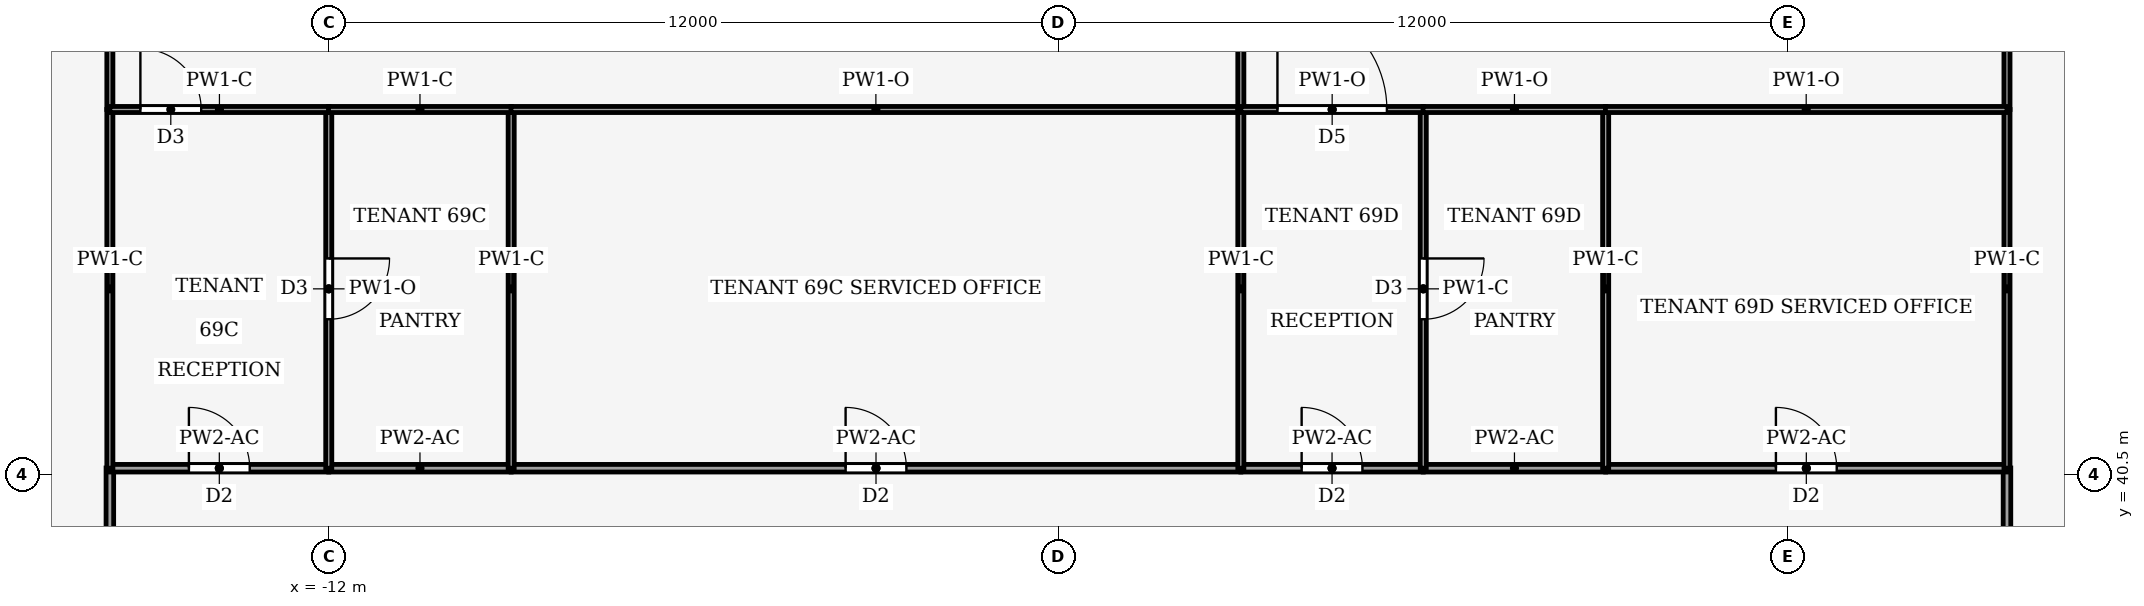
"""IFC4 building model, lengths in metres.
Left out: names, types, materials, properties, quantities, classifications, styles, units other than length and angle.
Written with IfcOpenShell. Run it as: python <this file> out.ifc"""

import sys

from ifc_helpers import new_model, si_unit, direction, frame, frame_2d, origin, place, context, subcontext, project, spatial, rectangle, extrude, element, fill, save


model = new_model("IFC4")
c1 = context("Model", 3, precision=1e-05, world=origin(), true_north=direction((0.0, 1.0)))
c2 = subcontext(c1, "Body", "Model", "MODEL_VIEW")
j1 = project(units=[si_unit("LENGTHUNIT", "METRE"), si_unit("PLANEANGLEUNIT", "RADIAN")], contexts=[c1])
p1 = place(None, origin())
s1 = spatial("IfcSite", under=j1, at=p1, CompositionType="ELEMENT")
p2 = place(p1, origin())
s2 = spatial("IfcBuilding", under=s1, at=p2, CompositionType="ELEMENT")
p3 = place(p2, frame((0.0, 0.0, 302.0)))
s3 = spatial("IfcBuildingStorey", under=s2, at=p3, CompositionType="ELEMENT", Elevation=302.0)
p4 = place(p3, frame((-15.6, 34.5, 0.0), z_axis=(0.0, 0.0, 1.0), x_axis=(0.0, 1.0, 0.0)))
e1 = element("IfcWall", 1, at=p4, inside=s3, PredefinedType="PARTITIONING", context=c2, shape_type="SweptSolid", body=[
    extrude(rectangle(XDim=6.104, YDim=0.125, at=frame_2d((3.052, 0.0))), origin(), (0.0, 0.0, 1.0), 3.14),
])
p5 = place(p4, frame((2.552, 0.0, 0.0)))
e2 = element("IfcOpeningElement", 2, at=p5, cuts=e1, PredefinedType="OPENING", context=c2, shape_type="SweptSolid", body=[
    extrude(rectangle(XDim=1.0, YDim=2.1, at=frame_2d((0.5, 1.05))), frame((0.0, 0.073, 0.0), z_axis=(0.0, -1.0, 0.0), x_axis=(1.0, 0.0, 0.0)), (0.0, 0.0, 1.0), 0.145),
])
p6 = place(p3, frame((15.6, 40.604, 0.0), z_axis=(0.0, 0.0, 1.0), x_axis=(0.0, -1.0, 0.0)))
e3 = element("IfcWall", 3, at=p6, inside=s3, PredefinedType="PARTITIONING", context=c2, shape_type="SweptSolid", body=[
    extrude(rectangle(XDim=6.104, YDim=0.125, at=frame_2d((3.052, 0.0))), origin(), (0.0, 0.0, 1.0), 3.14),
])
p7 = place(p6, frame((2.552, 0.0, 0.0)))
e4 = element("IfcOpeningElement", 4, at=p7, cuts=e3, PredefinedType="OPENING", context=c2, shape_type="SweptSolid", body=[
    extrude(rectangle(XDim=1.0, YDim=2.1, at=frame_2d((0.5, 1.05))), frame((0.0, 0.073, 0.0), z_axis=(0.0, -1.0, 0.0), x_axis=(1.0, 0.0, 0.0)), (0.0, 0.0, 1.0), 0.145),
])
p8 = place(p3, frame((-15.6, 40.6, 0.0), z_axis=(0.0, 0.0, 1.0), x_axis=(1.0, 0.0, 0.0)))
e5 = element("IfcWall", 5, at=p8, inside=s3, PredefinedType="PARTITIONING", context=c2, shape_type="SweptSolid", body=[
    extrude(rectangle(XDim=3.6, YDim=0.125, at=frame_2d((1.8, 0.0))), origin(), (0.0, 0.0, 1.0), 3.39),
])
p9 = place(p8, frame((1.3, 0.0, 0.0)))
e6 = element("IfcOpeningElement", 6, at=p9, cuts=e5, PredefinedType="OPENING", context=c2, shape_type="SweptSolid", body=[
    extrude(rectangle(XDim=1.0, YDim=2.1, at=frame_2d((0.5, 1.05))), frame((0.0, 0.073, 0.0), z_axis=(0.0, -1.0, 0.0), x_axis=(1.0, 0.0, 0.0)), (0.0, 0.0, 1.0), 0.145),
])
p10 = place(p3, frame((-9.0, 40.6, 0.0), z_axis=(0.0, 0.0, 1.0), x_axis=(-1.0, 0.0, 0.0)))
e7 = element("IfcWall", 7, at=p10, inside=s3, PredefinedType="PARTITIONING", context=c2, shape_type="SweptSolid", body=[
    extrude(rectangle(XDim=3.0, YDim=0.125, at=frame_2d((1.5, 0.0))), origin(), (0.0, 0.0, 1.0), 3.39),
])
p11 = place(p3, frame((-9.0, 40.6, 0.0), z_axis=(0.0, 0.0, 1.0), x_axis=(1.0, 0.0, 0.0)))
e8 = element("IfcWall", 8, at=p11, inside=s3, PredefinedType="PARTITIONING", context=c2, shape_type="SweptSolid", body=[
    extrude(rectangle(XDim=12.0, YDim=0.125, at=frame_2d((6.0, 0.0))), origin(), (0.0, 0.0, 1.0), 3.39),
])
p12 = place(p11, frame((5.5, 0.0, 0.0)))
e9 = element("IfcOpeningElement", 9, at=p12, cuts=e8, PredefinedType="OPENING", context=c2, shape_type="SweptSolid", body=[
    extrude(rectangle(XDim=1.0, YDim=2.1, at=frame_2d((0.5, 1.05))), frame((0.0, 0.073, 0.0), z_axis=(0.0, -1.0, 0.0), x_axis=(1.0, 0.0, 0.0)), (0.0, 0.0, 1.0), 0.145),
])
p13 = place(p3, frame((3.0, 40.6, 0.0), z_axis=(0.0, 0.0, 1.0), x_axis=(1.0, 0.0, 0.0)))
e10 = element("IfcWall", 10, at=p13, inside=s3, PredefinedType="PARTITIONING", context=c2, shape_type="SweptSolid", body=[
    extrude(rectangle(XDim=3.0, YDim=0.125, at=frame_2d((1.5, 0.0))), origin(), (0.0, 0.0, 1.0), 3.39),
])
p14 = place(p13, frame((1.0, 0.0, 0.0)))
e11 = element("IfcOpeningElement", 11, at=p14, cuts=e10, PredefinedType="OPENING", context=c2, shape_type="SweptSolid", body=[
    extrude(rectangle(XDim=1.0, YDim=2.1, at=frame_2d((0.5, 1.05))), frame((0.0, 0.073, 0.0), z_axis=(0.0, -1.0, 0.0), x_axis=(1.0, 0.0, 0.0)), (0.0, 0.0, 1.0), 0.145),
])
p15 = place(p3, frame((9.0, 40.6, 0.0), z_axis=(0.0, 0.0, 1.0), x_axis=(-1.0, 0.0, 0.0)))
e12 = element("IfcWall", 12, at=p15, inside=s3, PredefinedType="PARTITIONING", context=c2, shape_type="SweptSolid", body=[
    extrude(rectangle(XDim=3.0, YDim=0.125, at=frame_2d((1.5, 0.0))), origin(), (0.0, 0.0, 1.0), 3.39),
])
p16 = place(p3, frame((9.0, 40.6, 0.0), z_axis=(0.0, 0.0, 1.0), x_axis=(1.0, 0.0, 0.0)))
e13 = element("IfcWall", 13, at=p16, inside=s3, PredefinedType="PARTITIONING", context=c2, shape_type="SweptSolid", body=[
    extrude(rectangle(XDim=6.6, YDim=0.125, at=frame_2d((3.3, 0.0))), origin(), (0.0, 0.0, 1.0), 3.39),
])
p17 = place(p16, frame((2.8, 0.0, 0.0)))
e14 = element("IfcOpeningElement", 14, at=p17, cuts=e13, PredefinedType="OPENING", context=c2, shape_type="SweptSolid", body=[
    extrude(rectangle(XDim=1.0, YDim=2.1, at=frame_2d((0.5, 1.05))), frame((0.0, 0.073, 0.0), z_axis=(0.0, -1.0, 0.0), x_axis=(1.0, 0.0, 0.0)), (0.0, 0.0, 1.0), 0.145),
])
p18 = place(p3, frame((-15.6, 40.6, 0.0), z_axis=(0.0, 0.0, 1.0), x_axis=(0.0, 1.0, 0.0)))
e15 = element("IfcWall", 15, at=p18, inside=s3, PredefinedType="PARTITIONING", context=c2, shape_type="SweptSolid", body=[
    extrude(rectangle(XDim=5.9, YDim=0.1, at=frame_2d((2.95, 0.0))), origin(), (0.0, 0.0, 1.0), 3.87),
])
p19 = place(p3, frame((-15.6, 46.5, 0.0), z_axis=(0.0, 0.0, 1.0), x_axis=(0.0, 1.0, 0.0)))
e16 = element("IfcWall", 16, at=p19, inside=s3, PredefinedType="PARTITIONING", context=c2, shape_type="SweptSolid", body=[
    extrude(rectangle(XDim=18.0, YDim=0.1, at=frame_2d((9.0, 0.0))), origin(), (0.0, 0.0, 1.0), 3.35),
])
p20 = place(p3, frame((15.6, 46.5, 0.0), z_axis=(0.0, 0.0, 1.0), x_axis=(0.0, -1.0, 0.0)))
e17 = element("IfcWall", 17, at=p20, inside=s3, PredefinedType="PARTITIONING", context=c2, shape_type="SweptSolid", body=[
    extrude(rectangle(XDim=5.9, YDim=0.1, at=frame_2d((2.95, 0.0))), origin(), (0.0, 0.0, 1.0), 3.87),
])
p21 = place(p3, frame((15.6, 64.5, 0.0), z_axis=(0.0, 0.0, 1.0), x_axis=(0.0, -1.0, 0.0)))
e18 = element("IfcWall", 18, at=p21, inside=s3, PredefinedType="PARTITIONING", context=c2, shape_type="SweptSolid", body=[
    extrude(rectangle(XDim=18.0, YDim=0.1, at=frame_2d((9.0, 0.0))), origin(), (0.0, 0.0, 1.0), 3.35),
])
p22 = place(p3, frame((-12.0, 46.5, 0.0), z_axis=(0.0, 0.0, 1.0), x_axis=(0.0, -1.0, 0.0)))
e19 = element("IfcWall", 19, at=p22, inside=s3, PredefinedType="PARTITIONING", context=c2, shape_type="SweptSolid", body=[
    extrude(rectangle(XDim=5.9, YDim=0.1, at=frame_2d((2.95, 0.0))), origin(), (0.0, 0.0, 1.0), 3.39),
])
p23 = place(p22, frame((2.45, 0.0, 0.0)))
e20 = element("IfcOpeningElement", 20, at=p23, cuts=e19, PredefinedType="OPENING", context=c2, shape_type="SweptSolid", body=[
    extrude(rectangle(XDim=1.0, YDim=2.1, at=frame_2d((0.5, 1.05))), frame((0.0, 0.06, 0.0), z_axis=(0.0, -1.0, 0.0), x_axis=(1.0, 0.0, 0.0)), (0.0, 0.0, 1.0), 0.12),
])
p24 = place(p3, frame((-15.6, 46.5, 0.0), z_axis=(0.0, 0.0, 1.0), x_axis=(1.0, 0.0, 0.0)))
e21 = element("IfcWall", 21, at=p24, inside=s3, PredefinedType="PARTITIONING", context=c2, shape_type="SweptSolid", body=[
    extrude(rectangle(XDim=3.604, YDim=0.1, at=frame_2d((1.802, 0.0))), origin(), (0.0, 0.0, 1.0), 3.87),
])
p25 = place(p24, frame((0.502, 0.0, 0.0)))
e22 = element("IfcOpeningElement", 22, at=p25, cuts=e21, PredefinedType="OPENING", context=c2, shape_type="SweptSolid", body=[
    extrude(rectangle(XDim=1.0, YDim=2.1, at=frame_2d((0.5, 1.05))), frame((0.0, 0.06, 0.0), z_axis=(0.0, -1.0, 0.0), x_axis=(1.0, 0.0, 0.0)), (0.0, 0.0, 1.0), 0.12),
])
p26 = place(p3, frame((-9.0, 40.6, 0.0), z_axis=(0.0, 0.0, 1.0), x_axis=(0.0, 1.0, 0.0)))
e23 = element("IfcWall", 23, at=p26, inside=s3, PredefinedType="PARTITIONING", context=c2, shape_type="SweptSolid", body=[
    extrude(rectangle(XDim=5.9, YDim=0.1, at=frame_2d((2.95, 0.0))), origin(), (0.0, 0.0, 1.0), 3.87),
])
p27 = place(p3, frame((-8.996, 46.5, 0.0), z_axis=(0.0, 0.0, 1.0), x_axis=(-1.0, 0.0, 0.0)))
e24 = element("IfcWall", 24, at=p27, inside=s3, PredefinedType="PARTITIONING", context=c2, shape_type="SweptSolid", body=[
    extrude(rectangle(XDim=3.008, YDim=0.1, at=frame_2d((1.504, 0.0))), origin(), (0.0, 0.0, 1.0), 3.87),
])
p28 = place(p3, frame((3.0, 46.5, 0.0), z_axis=(0.0, 0.0, 1.0), x_axis=(-1.0, 0.0, 0.0)))
e25 = element("IfcWall", 25, at=p28, inside=s3, PredefinedType="PARTITIONING", context=c2, shape_type="SweptSolid", body=[
    extrude(rectangle(XDim=12.004, YDim=0.1, at=frame_2d((6.002, 0.0))), origin(), (0.0, 0.0, 1.0), 3.39),
])
p29 = place(p3, frame((3.0, 40.6, 0.0), z_axis=(0.0, 0.0, 1.0), x_axis=(0.0, 1.0, 0.0)))
e26 = element("IfcWall", 26, at=p29, inside=s3, PredefinedType="PARTITIONING", context=c2, shape_type="SweptSolid", body=[
    extrude(rectangle(XDim=5.9, YDim=0.1, at=frame_2d((2.95, 0.0))), origin(), (0.0, 0.0, 1.0), 3.87),
])
p30 = place(p3, frame((3.0, 46.5, 0.0), z_axis=(0.0, 0.0, 1.0), x_axis=(0.0, 1.0, 0.0)))
e27 = element("IfcWall", 27, at=p30, inside=s3, PredefinedType="PARTITIONING", context=c2, shape_type="SweptSolid", body=[
    extrude(rectangle(XDim=18.0, YDim=0.1, at=frame_2d((9.0, 0.0))), origin(), (0.0, 0.0, 1.0), 3.24),
])
p31 = place(p3, frame((6.0, 46.5, 0.0), z_axis=(0.0, 0.0, 1.0), x_axis=(0.0, -1.0, 0.0)))
e28 = element("IfcWall", 28, at=p31, inside=s3, PredefinedType="PARTITIONING", context=c2, shape_type="SweptSolid", body=[
    extrude(rectangle(XDim=5.9, YDim=0.1, at=frame_2d((2.95, 0.0))), origin(), (0.0, 0.0, 1.0), 3.87),
])
p32 = place(p31, frame((2.45, 0.0, 0.0)))
e29 = element("IfcOpeningElement", 29, at=p32, cuts=e28, PredefinedType="OPENING", context=c2, shape_type="SweptSolid", body=[
    extrude(rectangle(XDim=1.0, YDim=2.1, at=frame_2d((0.5, 1.05))), frame((0.0, 0.06, 0.0), z_axis=(0.0, -1.0, 0.0), x_axis=(1.0, 0.0, 0.0)), (0.0, 0.0, 1.0), 0.12),
])
p33 = place(p3, frame((3.0, 46.5, 0.0), z_axis=(0.0, 0.0, 1.0), x_axis=(1.0, 0.0, 0.0)))
e30 = element("IfcWall", 30, at=p33, inside=s3, PredefinedType="PARTITIONING", context=c2, shape_type="SweptSolid", body=[
    extrude(rectangle(XDim=3.004, YDim=0.1, at=frame_2d((1.502, 0.0))), origin(), (0.0, 0.0, 1.0), 3.39),
])
p34 = place(p33, frame((0.602, 0.0, 0.0)))
e31 = element("IfcOpeningElement", 31, at=p34, cuts=e30, PredefinedType="OPENING", context=c2, shape_type="SweptSolid", body=[
    extrude(rectangle(XDim=1.8, YDim=2.1, at=frame_2d((0.9, 1.05))), frame((0.0, 0.06, 0.0), z_axis=(0.0, -1.0, 0.0), x_axis=(1.0, 0.0, 0.0)), (0.0, 0.0, 1.0), 0.12),
])
p35 = place(p3, frame((9.0, 40.6, 0.0), z_axis=(0.0, 0.0, 1.0), x_axis=(0.0, 1.0, 0.0)))
e32 = element("IfcWall", 32, at=p35, inside=s3, PredefinedType="PARTITIONING", context=c2, shape_type="SweptSolid", body=[
    extrude(rectangle(XDim=5.9, YDim=0.1, at=frame_2d((2.95, 0.0))), origin(), (0.0, 0.0, 1.0), 3.87),
])
p36 = place(p3, frame((9.004, 46.5, 0.0), z_axis=(0.0, 0.0, 1.0), x_axis=(-1.0, 0.0, 0.0)))
e33 = element("IfcWall", 33, at=p36, inside=s3, PredefinedType="PARTITIONING", context=c2, shape_type="SweptSolid", body=[
    extrude(rectangle(XDim=3.008, YDim=0.1, at=frame_2d((1.504, 0.0))), origin(), (0.0, 0.0, 1.0), 3.39),
])
p37 = place(p3, frame((15.6, 46.5, 0.0), z_axis=(0.0, 0.0, 1.0), x_axis=(-1.0, 0.0, 0.0)))
e34 = element("IfcWall", 34, at=p37, inside=s3, PredefinedType="PARTITIONING", context=c2, shape_type="SweptSolid", body=[
    extrude(rectangle(XDim=6.604, YDim=0.1, at=frame_2d((3.302, 0.0))), origin(), (0.0, 0.0, 1.0), 3.39),
])
p38 = place(p9, origin())
e35 = element("IfcDoor", 35, at=p38, inside=s3, OperationType="SINGLE_SWING_LEFT", PredefinedType="DOOR", context=c2, shape_type="SweptSolid", body=[
    extrude(rectangle(XDim=1.0, YDim=2.1, at=frame_2d((0.5, 1.05))), frame((0.0, 0.025, 0.0), z_axis=(0.0, -1.0, 0.0), x_axis=(1.0, 0.0, 0.0)), (0.0, 0.0, 1.0), 0.05),
])
fill(e6, e35)
p39 = place(p12, origin())
e36 = element("IfcDoor", 36, at=p39, inside=s3, OperationType="SINGLE_SWING_RIGHT", PredefinedType="DOOR", context=c2, shape_type="SweptSolid", body=[
    extrude(rectangle(XDim=1.0, YDim=2.1, at=frame_2d((0.5, 1.05))), frame((0.0, 0.025, 0.0), z_axis=(0.0, -1.0, 0.0), x_axis=(1.0, 0.0, 0.0)), (0.0, 0.0, 1.0), 0.05),
])
fill(e9, e36)
p40 = place(p14, origin())
e37 = element("IfcDoor", 37, at=p40, inside=s3, OperationType="SINGLE_SWING_LEFT", PredefinedType="DOOR", context=c2, shape_type="SweptSolid", body=[
    extrude(rectangle(XDim=1.0, YDim=2.1, at=frame_2d((0.5, 1.05))), frame((0.0, 0.025, 0.0), z_axis=(0.0, -1.0, 0.0), x_axis=(1.0, 0.0, 0.0)), (0.0, 0.0, 1.0), 0.05),
])
fill(e11, e37)
p41 = place(p17, origin())
e38 = element("IfcDoor", 38, at=p41, inside=s3, OperationType="SINGLE_SWING_RIGHT", PredefinedType="DOOR", context=c2, shape_type="SweptSolid", body=[
    extrude(rectangle(XDim=1.0, YDim=2.1, at=frame_2d((0.5, 1.05))), frame((0.0, 0.025, 0.0), z_axis=(0.0, -1.0, 0.0), x_axis=(1.0, 0.0, 0.0)), (0.0, 0.0, 1.0), 0.05),
])
fill(e14, e38)
p42 = place(p23, origin())
e39 = element("IfcDoor", 39, at=p42, inside=s3, OperationType="SINGLE_SWING_LEFT", PredefinedType="DOOR", context=c2, shape_type="SweptSolid", body=[
    extrude(rectangle(XDim=1.0, YDim=2.1, at=frame_2d((0.5, 1.05))), frame((0.0, 0.025, 0.0), z_axis=(0.0, -1.0, 0.0), x_axis=(1.0, 0.0, 0.0)), (0.0, 0.0, 1.0), 0.05),
])
fill(e20, e39)
p43 = place(p25, origin())
e40 = element("IfcDoor", 40, at=p43, inside=s3, OperationType="SINGLE_SWING_LEFT", PredefinedType="DOOR", context=c2, shape_type="SweptSolid", body=[
    extrude(rectangle(XDim=1.0, YDim=2.1, at=frame_2d((0.5, 1.05))), frame((0.0, 0.025, 0.0), z_axis=(0.0, -1.0, 0.0), x_axis=(1.0, 0.0, 0.0)), (0.0, 0.0, 1.0), 0.05),
])
fill(e22, e40)
p44 = place(p32, origin())
e41 = element("IfcDoor", 41, at=p44, inside=s3, OperationType="SINGLE_SWING_LEFT", PredefinedType="DOOR", context=c2, shape_type="SweptSolid", body=[
    extrude(rectangle(XDim=1.0, YDim=2.1, at=frame_2d((0.5, 1.05))), frame((0.0, 0.025, 0.0), z_axis=(0.0, -1.0, 0.0), x_axis=(1.0, 0.0, 0.0)), (0.0, 0.0, 1.0), 0.05),
])
fill(e29, e41)
p45 = place(p34, origin())
e42 = element("IfcDoor", 42, at=p45, inside=s3, OperationType="DOUBLE_DOOR_SINGLE_SWING", PredefinedType="DOOR", context=c2, shape_type="SweptSolid", body=[
    extrude(rectangle(XDim=1.8, YDim=2.1, at=frame_2d((0.9, 1.05))), frame((0.0, 0.025, 0.0), z_axis=(0.0, -1.0, 0.0), x_axis=(1.0, 0.0, 0.0)), (0.0, 0.0, 1.0), 0.05),
])
fill(e31, e42)
save(model, sys.argv[1])
